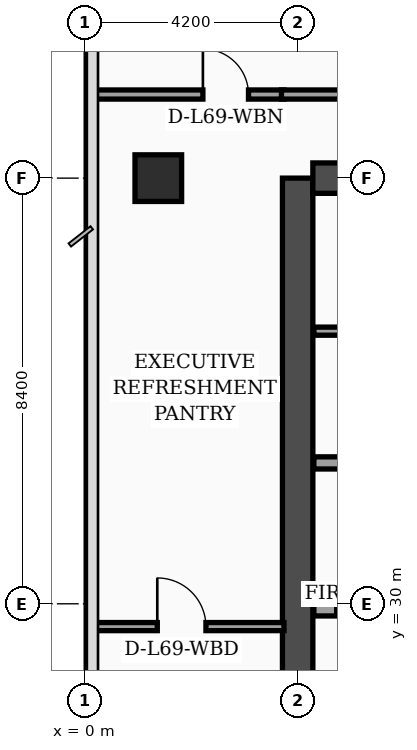
"""IFC4 building model, lengths in metres.
Left out: names, types, materials, properties, quantities, classifications, styles, units other than length and angle.
Written with IfcOpenShell. Run it as: python <this file> out.ifc"""

import sys

from ifc_helpers import new_model, si_unit, direction, frame, frame_2d, origin, origin_2d, place, context, subcontext, project, spatial, rectangle, extrude, element, fill, save


model = new_model("IFC4")
c1 = context("Model", 3, precision=1e-05, world=origin(), true_north=direction((0.0, 1.0)))
c2 = subcontext(c1, "Body", "Model", "MODEL_VIEW")
j1 = project(units=[si_unit("LENGTHUNIT", "METRE"), si_unit("PLANEANGLEUNIT", "RADIAN")], contexts=[c1])
p1 = place(None, origin())
s1 = spatial("IfcSite", under=j1, at=p1, CompositionType="ELEMENT")
p2 = place(p1, origin())
s2 = spatial("IfcBuilding", under=s1, at=p2, CompositionType="ELEMENT")
p3 = place(p2, frame((0.0, 0.0, 278.7)))
s3 = spatial("IfcBuildingStorey", under=s2, at=p3, CompositionType="ELEMENT", Elevation=278.7)
p4 = place(p3, frame((4.2, 16.8, 0.0), z_axis=(0.0, 0.0, 1.0), x_axis=(0.0, 1.0, 0.0)))
e1 = element("IfcWall", 1, at=p4, inside=s3, PredefinedType="SHEAR", context=c2, shape_type="SweptSolid", body=[
    extrude(rectangle(XDim=21.6, YDim=0.6, at=frame_2d((10.8, 0.0))), origin(), (0.0, 0.0, 1.0), 3.52),
])
p5 = place(p3, frame((4.5, 38.4, 0.0), z_axis=(0.0, 0.0, 1.0), x_axis=(1.0, 0.0, 0.0)))
e2 = element("IfcWall", 2, at=p5, inside=s3, PredefinedType="SHEAR", context=c2, shape_type="SweptSolid", body=[
    extrude(rectangle(XDim=10.2, YDim=0.6, at=frame_2d((5.1, 0.0))), origin(), (0.0, 0.0, 1.0), 3.52),
])
p6 = place(p5, frame((5.8, 0.0, 0.0)))
e3 = element("IfcOpeningElement", 3, at=p6, cuts=e2, PredefinedType="OPENING", context=c2, shape_type="SweptSolid", body=[
    extrude(rectangle(XDim=1.1, YDim=2.2, at=frame_2d((0.55, 1.1))), frame((0.0, 0.31, 0.0), z_axis=(0.0, -1.0, 0.0), x_axis=(1.0, 0.0, 0.0)), (0.0, 0.0, 1.0), 0.62),
])
p7 = place(p3, frame((1.45, 38.4, 0.0), z_axis=(0.0, 0.0, 1.0), x_axis=(1.0, 0.0, 0.0)))
e4 = element("IfcColumn", 4, at=p7, inside=s3, PredefinedType="COLUMN", context=c2, shape_type="SweptSolid", body=[
    extrude(rectangle(XDim=0.92, YDim=0.92, at=origin_2d()), origin(), (0.0, 0.0, 1.0), 3.52),
])
p8 = place(p3, frame((4.52, 29.88, 0.0), z_axis=(0.0, 0.0, 1.0), x_axis=(1.0, 0.0, 0.0)))
e5 = element("IfcWall", 5, at=p8, inside=s3, PredefinedType="SOLIDWALL", context=c2, shape_type="SweptSolid", body=[
    extrude(rectangle(XDim=4.9, YDim=0.24, at=frame_2d((2.45, 0.0))), origin(), (0.0, 0.0, 1.0), 3.52),
])
p9 = place(p8, frame((0.45, 0.0, 0.0)))
e6 = element("IfcOpeningElement", 6, at=p9, cuts=e5, PredefinedType="OPENING", context=c2, shape_type="SweptSolid", body=[
    extrude(rectangle(XDim=1.3, YDim=2.35, at=frame_2d((0.65, 1.175))), frame((0.0, 0.13, 0.0), z_axis=(0.0, -1.0, 0.0), x_axis=(1.0, 0.0, 0.0)), (0.0, 0.0, 1.0), 0.26),
])
p10 = place(p3, frame((4.52, 32.78, 0.0), z_axis=(0.0, 0.0, 1.0), x_axis=(1.0, 0.0, 0.0)))
e7 = element("IfcWall", 7, at=p10, inside=s3, PredefinedType="SOLIDWALL", context=c2, shape_type="SweptSolid", body=[
    extrude(rectangle(XDim=4.9, YDim=0.24, at=frame_2d((2.45, 0.0))), origin(), (0.0, 0.0, 1.0), 3.17),
])
p11 = place(p3, frame((4.52, 35.38, 0.0), z_axis=(0.0, 0.0, 1.0), x_axis=(1.0, 0.0, 0.0)))
e8 = element("IfcWall", 8, at=p11, inside=s3, PredefinedType="PARTITIONING", context=c2, shape_type="SweptSolid", body=[
    extrude(rectangle(XDim=4.9, YDim=0.16, at=frame_2d((2.45, 0.0))), origin(), (0.0, 0.0, 1.0), 3.52),
])
p12 = place(p11, frame((1.3, 0.0, 0.0)))
e9 = element("IfcOpeningElement", 9, at=p12, cuts=e8, PredefinedType="OPENING", context=c2, shape_type="SweptSolid", body=[
    extrude(rectangle(XDim=0.98, YDim=2.15, at=frame_2d((0.49, 1.075))), frame((0.0, 0.09, 0.0), z_axis=(0.0, -1.0, 0.0), x_axis=(1.0, 0.0, 0.0)), (0.0, 0.0, 1.0), 0.18),
])
p13 = place(p3, frame((0.08, 29.55, 0.0), z_axis=(0.0, 0.0, 1.0), x_axis=(1.0, 0.0, 0.0)))
e10 = element("IfcWall", 10, at=p13, inside=s3, PredefinedType="PARTITIONING", context=c2, shape_type="SweptSolid", body=[
    extrude(rectangle(XDim=3.85, YDim=0.16, at=frame_2d((1.925, 0.0))), origin(), (0.0, 0.0, 1.0), 3.07),
])
p14 = place(p13, frame((1.35, 0.0, 0.0)))
e11 = element("IfcOpeningElement", 11, at=p14, cuts=e10, PredefinedType="OPENING", context=c2, shape_type="SweptSolid", body=[
    extrude(rectangle(XDim=0.96, YDim=2.2, at=frame_2d((0.48, 1.1))), frame((0.0, 0.09, 0.0), z_axis=(0.0, -1.0, 0.0), x_axis=(1.0, 0.0, 0.0)), (0.0, 0.0, 1.0), 0.18),
])
p15 = place(p3, frame((0.08, 40.05, 0.0), z_axis=(0.0, 0.0, 1.0), x_axis=(1.0, 0.0, 0.0)))
e12 = element("IfcWall", 12, at=p15, inside=s3, PredefinedType="PARTITIONING", context=c2, shape_type="SweptSolid", body=[
    extrude(rectangle(XDim=3.85, YDim=0.18, at=frame_2d((1.925, 0.0))), origin(), (0.0, 0.0, 1.0), 2.97),
])
p16 = place(p15, frame((2.25, 0.0, 0.0)))
e13 = element("IfcOpeningElement", 13, at=p16, cuts=e12, PredefinedType="OPENING", context=c2, shape_type="SweptSolid", body=[
    extrude(rectangle(XDim=0.9, YDim=2.15, at=frame_2d((0.45, 1.075))), frame((0.0, 0.1, 0.0), z_axis=(0.0, -1.0, 0.0), x_axis=(1.0, 0.0, 0.0)), (0.0, 0.0, 1.0), 0.2),
])
p17 = place(p3, frame((3.88, 40.05, 0.0), z_axis=(0.0, 0.0, 1.0), x_axis=(1.0, 0.0, 0.0)))
e14 = element("IfcWall", 14, at=p17, inside=s3, PredefinedType="PARTITIONING", context=c2, shape_type="SweptSolid", body=[
    extrude(rectangle(XDim=11.27, YDim=0.18, at=frame_2d((5.635, 0.0))), origin(), (0.0, 0.0, 1.0), 2.97),
])
p18 = place(p9, origin())
e15 = element("IfcDoor", 15, at=p18, inside=s3, OperationType="DOUBLE_DOOR_SLIDING", PredefinedType="DOOR", context=c2, shape_type="SweptSolid", body=[
    extrude(rectangle(XDim=1.3, YDim=2.35, at=frame_2d((0.65, 1.175))), frame((0.0, 0.025, 0.0), z_axis=(0.0, -1.0, 0.0), x_axis=(1.0, 0.0, 0.0)), (0.0, 0.0, 1.0), 0.05),
])
fill(e6, e15)
p19 = place(p14, origin())
e16 = element("IfcDoor", 16, at=p19, inside=s3, OperationType="SINGLE_SWING_LEFT", PredefinedType="DOOR", context=c2, shape_type="SweptSolid", body=[
    extrude(rectangle(XDim=0.96, YDim=2.2, at=frame_2d((0.48, 1.1))), frame((0.0, 0.025, 0.0), z_axis=(0.0, -1.0, 0.0), x_axis=(1.0, 0.0, 0.0)), (0.0, 0.0, 1.0), 0.05),
])
fill(e11, e16)
p20 = place(p16, origin())
e17 = element("IfcDoor", 17, at=p20, inside=s3, OperationType="SINGLE_SWING_LEFT", PredefinedType="DOOR", context=c2, shape_type="SweptSolid", body=[
    extrude(rectangle(XDim=0.9, YDim=2.15, at=frame_2d((0.45, 1.075))), frame((0.0, 0.025, 0.0), z_axis=(0.0, -1.0, 0.0), x_axis=(1.0, 0.0, 0.0)), (0.0, 0.0, 1.0), 0.05),
])
fill(e13, e17)
save(model, sys.argv[1])
